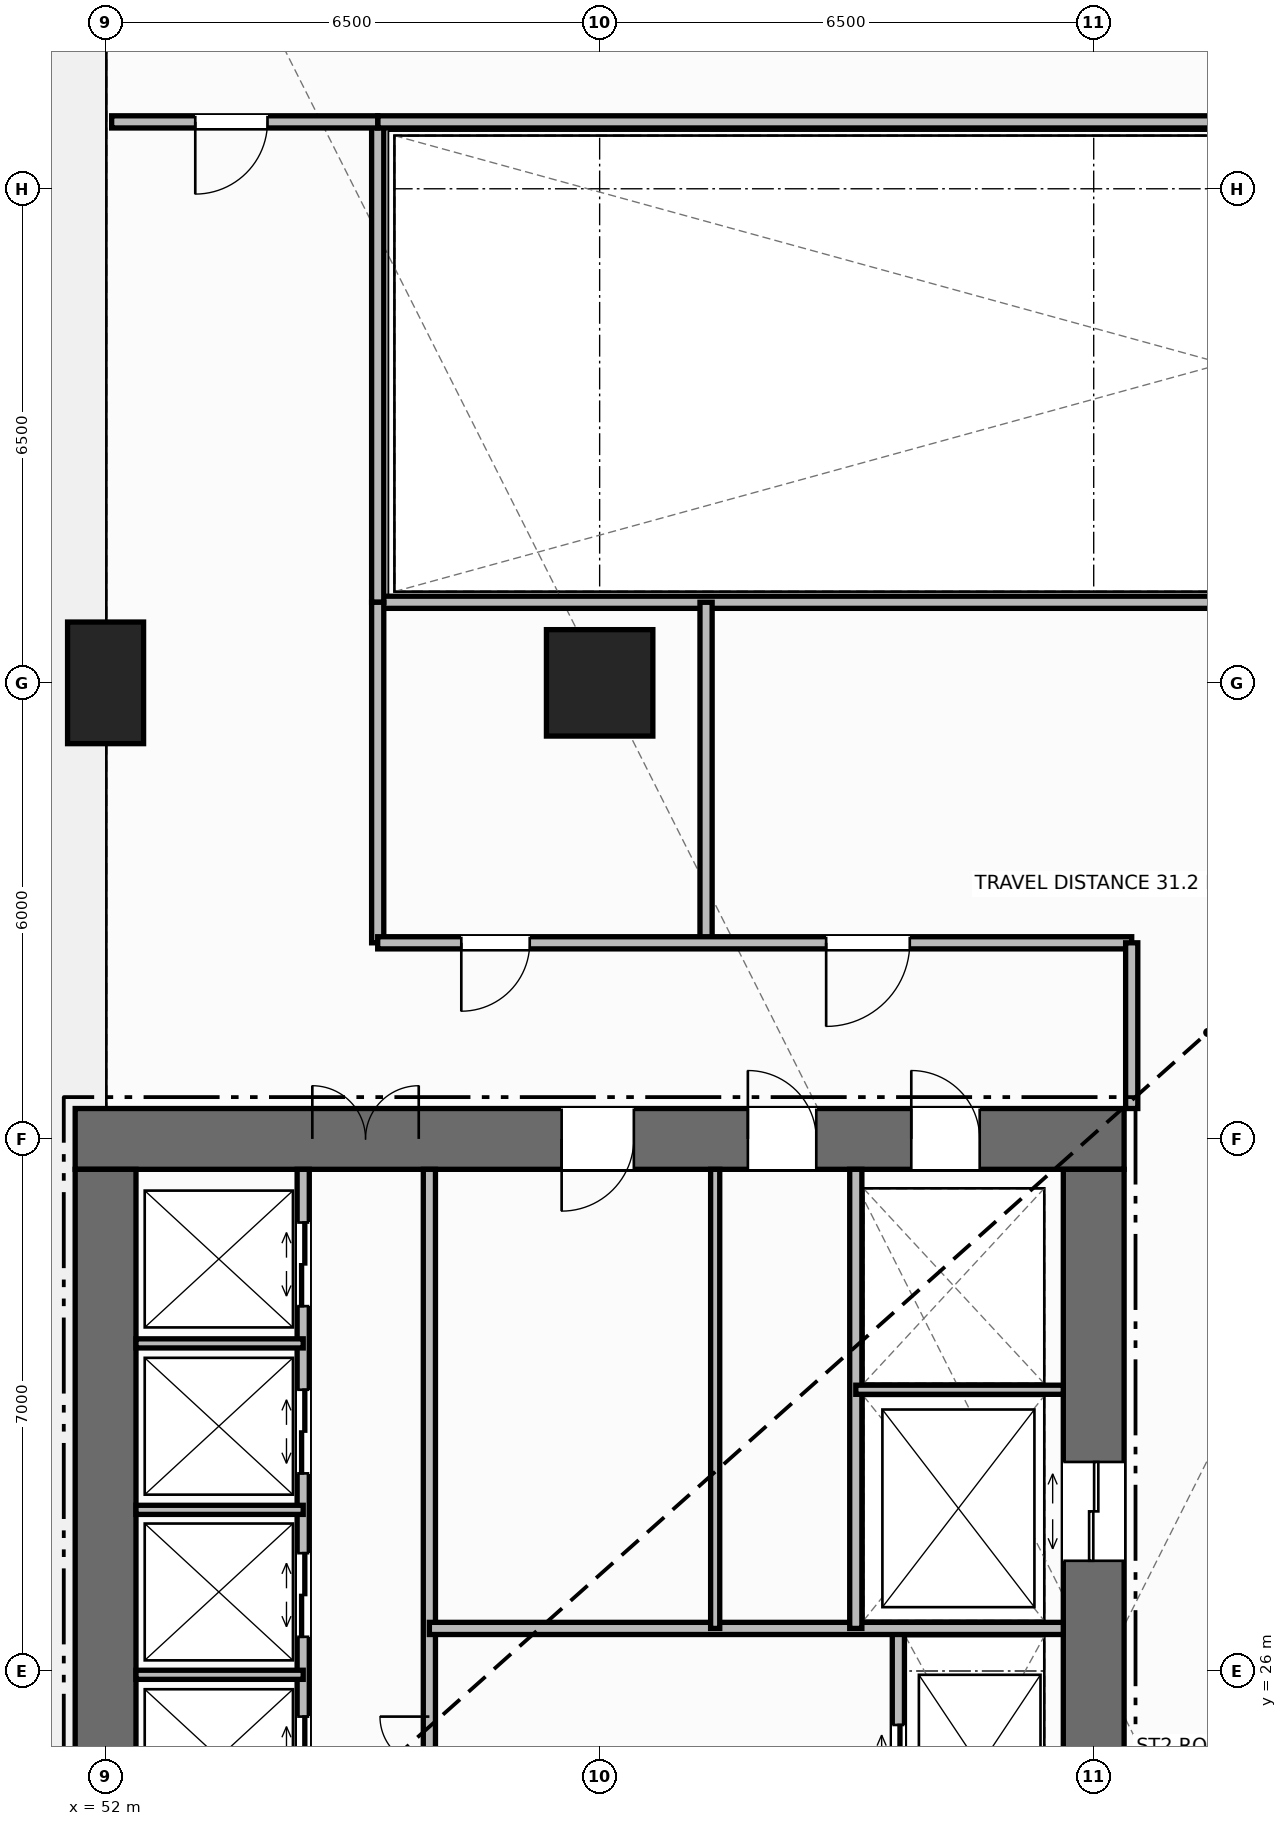
"""IFC4 building model, lengths in metres.
Left out: names, types, materials, properties, quantities, classifications, styles, units other than length and angle.
Written with IfcOpenShell. Run it as: python <this file> out.ifc"""

import sys

from ifc_helpers import new_model, si_unit, direction, frame, frame_2d, origin, origin_2d, place, context, subcontext, project, spatial, rectangle, extrude, element, fill, save


model = new_model("IFC4")
c1 = context("Model", 3, precision=1e-05, world=origin(), true_north=direction((0.0, 1.0)))
c2 = subcontext(c1, "Body", "Model", "MODEL_VIEW")
j1 = project(units=[si_unit("LENGTHUNIT", "METRE"), si_unit("PLANEANGLEUNIT", "RADIAN")], contexts=[c1])
p1 = place(None, origin())
s1 = spatial("IfcSite", under=j1, at=p1, CompositionType="ELEMENT")
p2 = place(p1, origin())
s2 = spatial("IfcBuilding", under=s1, at=p2, CompositionType="ELEMENT")
p3 = place(p2, origin())
s3 = spatial("IfcBuildingStorey", under=s2, at=p3, CompositionType="ELEMENT", Elevation=0.0)
p4 = place(p3, frame((51.6, 33.0, 0.0), z_axis=(0.0, 0.0, 1.0), x_axis=(1.0, 0.0, 0.0)))
e1 = element("IfcWall", 1, at=p4, inside=s3, PredefinedType="SHEAR", context=c2, shape_type="SweptSolid", body=[
    extrude(rectangle(XDim=13.8, YDim=0.8, at=frame_2d((6.9, 0.0))), origin(), (0.0, 0.0, 1.0), 6.0),
])
p5 = place(p4, frame((3.12, 0.0, 0.0)))
e2 = element("IfcOpeningElement", 2, at=p5, cuts=e1, PredefinedType="OPENING", context=c2, shape_type="SweptSolid", body=[
    extrude(rectangle(XDim=1.4, YDim=2.2, at=frame_2d((0.7, 1.1))), frame((0.0, 0.41, 0.0), z_axis=(0.0, -1.0, 0.0), x_axis=(1.0, 0.0, 0.0)), (0.0, 0.0, 1.0), 0.82),
])
p6 = place(p4, frame((11.0, 0.0, 0.0)))
e3 = element("IfcOpeningElement", 3, at=p6, cuts=e1, PredefinedType="OPENING", context=c2, shape_type="SweptSolid", body=[
    extrude(rectangle(XDim=0.9, YDim=2.15, at=frame_2d((0.45, 1.075))), frame((0.0, 0.41, 0.0), z_axis=(0.0, -1.0, 0.0), x_axis=(1.0, 0.0, 0.0)), (0.0, 0.0, 1.0), 0.82),
])
p7 = place(p4, frame((6.4, 0.0, 0.0)))
e4 = element("IfcOpeningElement", 4, at=p7, cuts=e1, PredefinedType="OPENING", context=c2, shape_type="SweptSolid", body=[
    extrude(rectangle(XDim=0.95, YDim=2.15, at=frame_2d((0.475, 1.075))), frame((0.0, 0.41, 0.0), z_axis=(0.0, -1.0, 0.0), x_axis=(1.0, 0.0, 0.0)), (0.0, 0.0, 1.0), 0.82),
])
p8 = place(p4, frame((8.85, 0.0, 0.0)))
e5 = element("IfcOpeningElement", 5, at=p8, cuts=e1, PredefinedType="OPENING", context=c2, shape_type="SweptSolid", body=[
    extrude(rectangle(XDim=0.9, YDim=2.15, at=frame_2d((0.45, 1.075))), frame((0.0, 0.41, 0.0), z_axis=(0.0, -1.0, 0.0), x_axis=(1.0, 0.0, 0.0)), (0.0, 0.0, 1.0), 0.82),
])
p9 = place(p3, frame((52.0, 19.4, 0.0), z_axis=(0.0, 0.0, 1.0), x_axis=(0.0, 1.0, 0.0)))
e6 = element("IfcWall", 6, at=p9, inside=s3, PredefinedType="SHEAR", context=c2, shape_type="SweptSolid", body=[
    extrude(rectangle(XDim=13.2, YDim=0.8, at=frame_2d((6.6, 0.0))), origin(), (0.0, 0.0, 1.0), 6.0),
])
p10 = place(p3, frame((65.0, 19.4, 0.0), z_axis=(0.0, 0.0, 1.0), x_axis=(0.0, 1.0, 0.0)))
e7 = element("IfcWall", 7, at=p10, inside=s3, PredefinedType="SHEAR", context=c2, shape_type="SweptSolid", body=[
    extrude(rectangle(XDim=13.2, YDim=0.8, at=frame_2d((6.6, 0.0))), origin(), (0.0, 0.0, 1.0), 6.0),
])
p11 = place(p10, frame((8.05, 0.0, 0.0)))
e8 = element("IfcOpeningElement", 8, at=p11, cuts=e7, PredefinedType="OPENING", context=c2, shape_type="SweptSolid", body=[
    extrude(rectangle(XDim=1.3, YDim=2.2, at=frame_2d((0.65, 1.1))), frame((0.0, 0.41, 0.0), z_axis=(0.0, -1.0, 0.0), x_axis=(1.0, 0.0, 0.0)), (0.0, 0.0, 1.0), 0.82),
])
p12 = place(p3, frame((58.5, 39.0, 0.0), z_axis=(0.0, 0.0, 1.0), x_axis=(1.0, 0.0, 0.0)))
e9 = element("IfcColumn", 9, at=p12, inside=s3, PredefinedType="COLUMN", context=c2, shape_type="SweptSolid", body=[
    extrude(rectangle(XDim=1.4, YDim=1.4, at=origin_2d()), origin(), (0.0, 0.0, 1.0), 6.0),
])
p13 = place(p3, frame((52.0, 39.0, 0.0), z_axis=(0.0, 0.0, 1.0), x_axis=(1.0, 0.0, 0.0)))
e10 = element("IfcColumn", 10, at=p13, inside=s3, PredefinedType="PILASTER", context=c2, shape_type="SweptSolid", body=[
    extrude(rectangle(XDim=1.0, YDim=1.6, at=origin_2d()), origin(), (0.0, 0.0, 1.0), 6.0),
])
p14 = place(p3, frame((54.6, 19.4, 0.0), z_axis=(0.0, 0.0, 1.0), x_axis=(0.0, 1.0, 0.0)))
e11 = element("IfcWall", 11, at=p14, inside=s3, PredefinedType="STANDARD", context=c2, shape_type="SweptSolid", body=[
    extrude(rectangle(XDim=13.2, YDim=0.16, at=frame_2d((6.6, 0.0))), origin(), (0.0, 0.0, 1.0), 5.72),
])
p15 = place(p14, frame((0.55, 0.0, 0.0)))
e12 = element("IfcOpeningElement", 12, at=p15, cuts=e11, PredefinedType="OPENING", context=c2, shape_type="SweptSolid", body=[
    extrude(rectangle(XDim=1.1, YDim=2.2, at=frame_2d((0.55, 1.1))), frame((0.0, 0.09, 0.0), z_axis=(0.0, -1.0, 0.0), x_axis=(1.0, 0.0, 0.0)), (0.0, 0.0, 1.0), 0.18),
])
p16 = place(p14, frame((2.7, 0.0, 0.0)))
e13 = element("IfcOpeningElement", 13, at=p16, cuts=e11, PredefinedType="OPENING", context=c2, shape_type="SweptSolid", body=[
    extrude(rectangle(XDim=1.1, YDim=2.2, at=frame_2d((0.55, 1.1))), frame((0.0, 0.09, 0.0), z_axis=(0.0, -1.0, 0.0), x_axis=(1.0, 0.0, 0.0)), (0.0, 0.0, 1.0), 0.18),
])
p17 = place(p14, frame((4.9, 0.0, 0.0)))
e14 = element("IfcOpeningElement", 14, at=p17, cuts=e11, PredefinedType="OPENING", context=c2, shape_type="SweptSolid", body=[
    extrude(rectangle(XDim=1.1, YDim=2.2, at=frame_2d((0.55, 1.1))), frame((0.0, 0.09, 0.0), z_axis=(0.0, -1.0, 0.0), x_axis=(1.0, 0.0, 0.0)), (0.0, 0.0, 1.0), 0.18),
])
p18 = place(p14, frame((7.05, 0.0, 0.0)))
e15 = element("IfcOpeningElement", 15, at=p18, cuts=e11, PredefinedType="OPENING", context=c2, shape_type="SweptSolid", body=[
    extrude(rectangle(XDim=1.1, YDim=2.2, at=frame_2d((0.55, 1.1))), frame((0.0, 0.09, 0.0), z_axis=(0.0, -1.0, 0.0), x_axis=(1.0, 0.0, 0.0)), (0.0, 0.0, 1.0), 0.18),
])
p19 = place(p14, frame((9.2, 0.0, 0.0)))
e16 = element("IfcOpeningElement", 16, at=p19, cuts=e11, PredefinedType="OPENING", context=c2, shape_type="SweptSolid", body=[
    extrude(rectangle(XDim=1.1, YDim=2.2, at=frame_2d((0.55, 1.1))), frame((0.0, 0.09, 0.0), z_axis=(0.0, -1.0, 0.0), x_axis=(1.0, 0.0, 0.0)), (0.0, 0.0, 1.0), 0.18),
])
p20 = place(p14, frame((11.4, 0.0, 0.0)))
e17 = element("IfcOpeningElement", 17, at=p20, cuts=e11, PredefinedType="OPENING", context=c2, shape_type="SweptSolid", body=[
    extrude(rectangle(XDim=1.1, YDim=2.2, at=frame_2d((0.55, 1.1))), frame((0.0, 0.09, 0.0), z_axis=(0.0, -1.0, 0.0), x_axis=(1.0, 0.0, 0.0)), (0.0, 0.0, 1.0), 0.18),
])
p21 = place(p3, frame((56.26, 23.09, 0.0), z_axis=(0.0, 0.0, 1.0), x_axis=(0.0, 1.0, 0.0)))
e18 = element("IfcWall", 18, at=p21, inside=s3, PredefinedType="STANDARD", context=c2, shape_type="SweptSolid", body=[
    extrude(rectangle(XDim=9.51, YDim=0.16, at=frame_2d((4.755, 0.0))), origin(), (0.0, 0.0, 1.0), 5.72),
])
p22 = place(p21, frame((1.01, 0.0, 0.0)))
e19 = element("IfcOpeningElement", 19, at=p22, cuts=e18, PredefinedType="OPENING", context=c2, shape_type="SweptSolid", body=[
    extrude(rectangle(XDim=1.3, YDim=2.2, at=frame_2d((0.65, 1.1))), frame((0.0, 0.09, 0.0), z_axis=(0.0, -1.0, 0.0), x_axis=(1.0, 0.0, 0.0)), (0.0, 0.0, 1.0), 0.18),
])
for number, where, z_axis, x_axis in (
    (20, (52.4, 25.95, 0.0), (0.0, 0.0, 1.0), (1.0, 0.0, 0.0)),
    (21, (52.4, 28.12, 0.0), (0.0, 0.0, 1.0), (1.0, 0.0, 0.0)),
    (22, (52.4, 30.31, 0.0), (0.0, 0.0, 1.0), (1.0, 0.0, 0.0)),
):
    element("IfcWall", number, at=place(p3, frame(where, z_axis=z_axis, x_axis=x_axis)), inside=s3, PredefinedType="PARTITIONING", context=c2, shape_type="SweptSolid", body=[
        extrude(rectangle(XDim=2.2, YDim=0.12, at=frame_2d((1.1, 0.0))), origin(), (0.0, 0.0, 1.0), 5.72),
    ])
p23 = place(p3, frame((62.43, 23.09, 0.0), z_axis=(0.0, 0.0, 1.0), x_axis=(0.0, 1.0, 0.0)))
e23 = element("IfcWall", 23, at=p23, inside=s3, PredefinedType="STANDARD", context=c2, shape_type="SweptSolid", body=[
    extrude(rectangle(XDim=3.47, YDim=0.16, at=frame_2d((1.735, 0.0))), origin(), (0.0, 0.0, 1.0), 5.72),
])
p24 = place(p23, frame((1.1, 0.0, 0.0)))
e24 = element("IfcOpeningElement", 24, at=p24, cuts=e23, PredefinedType="OPENING", context=c2, shape_type="SweptSolid", body=[
    extrude(rectangle(XDim=1.1, YDim=2.2, at=frame_2d((0.55, 1.1))), frame((0.0, 0.09, 0.0), z_axis=(0.0, -1.0, 0.0), x_axis=(1.0, 0.0, 0.0)), (0.0, 0.0, 1.0), 0.18),
])
p25 = place(p3, frame((56.26, 26.56, 0.0), z_axis=(0.0, 0.0, 1.0), x_axis=(1.0, 0.0, 0.0)))
e25 = element("IfcWall", 25, at=p25, inside=s3, PredefinedType="STANDARD", context=c2, shape_type="SweptSolid", body=[
    extrude(rectangle(XDim=8.34, YDim=0.16, at=frame_2d((4.17, 0.0))), origin(), (0.0, 0.0, 1.0), 5.72),
])
p26 = place(p3, frame((61.87, 26.56, 0.0), z_axis=(0.0, 0.0, 1.0), x_axis=(0.0, 1.0, 0.0)))
e26 = element("IfcWall", 26, at=p26, inside=s3, PredefinedType="STANDARD", context=c2, shape_type="SweptSolid", body=[
    extrude(rectangle(XDim=6.04, YDim=0.16, at=frame_2d((3.02, 0.0))), origin(), (0.0, 0.0, 1.0), 5.72),
])
p27 = place(p3, frame((61.87, 29.7, 0.0), z_axis=(0.0, 0.0, 1.0), x_axis=(1.0, 0.0, 0.0)))
e27 = element("IfcWall", 27, at=p27, inside=s3, PredefinedType="PARTITIONING", context=c2, shape_type="SweptSolid", body=[
    extrude(rectangle(XDim=2.73, YDim=0.12, at=frame_2d((1.365, 0.0))), origin(), (0.0, 0.0, 1.0), 5.72),
])
p28 = place(p3, frame((60.02, 26.56, 0.0), z_axis=(0.0, 0.0, 1.0), x_axis=(0.0, 1.0, 0.0)))
e28 = element("IfcWall", 28, at=p28, inside=s3, PredefinedType="PARTITIONING", context=c2, shape_type="SweptSolid", body=[
    extrude(rectangle(XDim=6.04, YDim=0.12, at=frame_2d((3.02, 0.0))), origin(), (0.0, 0.0, 1.0), 5.72),
])
p29 = place(p3, frame((55.58, 40.06, 0.0), z_axis=(0.0, 0.0, 1.0), x_axis=(1.0, 0.0, 0.0)))
e29 = element("IfcWall", 29, at=p29, inside=s3, PredefinedType="STANDARD", context=c2, shape_type="SweptSolid", body=[
    extrude(rectangle(XDim=22.47, YDim=0.16, at=frame_2d((11.235, 0.0))), origin(), (0.0, 0.0, 1.0), 5.72),
])
p30 = place(p3, frame((55.58, 40.06, 0.0), z_axis=(0.0, 0.0, 1.0), x_axis=(0.0, 1.0, 0.0)))
e30 = element("IfcWall", 30, at=p30, inside=s3, PredefinedType="STANDARD", context=c2, shape_type="SweptSolid", body=[
    extrude(rectangle(XDim=6.32, YDim=0.16, at=frame_2d((3.16, 0.0))), origin(), (0.0, 0.0, 1.0), 5.72),
])
p31 = place(p3, frame((55.58, 46.38, 0.0), z_axis=(0.0, 0.0, 1.0), x_axis=(1.0, 0.0, 0.0)))
e31 = element("IfcWall", 31, at=p31, inside=s3, PredefinedType="STANDARD", context=c2, shape_type="SweptSolid", body=[
    extrude(rectangle(XDim=22.47, YDim=0.16, at=frame_2d((11.235, 0.0))), origin(), (0.0, 0.0, 1.0), 5.72),
])
for number, where, z_axis, x_axis in (
    (32, (55.58, 35.58, 0.0), (0.0, 0.0, 1.0), (0.0, 1.0, 0.0)),
    (33, (59.9, 35.58, 0.0), (0.0, 0.0, 1.0), (0.0, 1.0, 0.0)),
):
    element("IfcWall", number, at=place(p3, frame(where, z_axis=z_axis, x_axis=x_axis)), inside=s3, PredefinedType="STANDARD", context=c2, shape_type="SweptSolid", body=[
        extrude(rectangle(XDim=4.48, YDim=0.16, at=frame_2d((2.24, 0.0))), origin(), (0.0, 0.0, 1.0), 5.72),
    ])
p32 = place(p3, frame((55.58, 35.58, 0.0), z_axis=(0.0, 0.0, 1.0), x_axis=(1.0, 0.0, 0.0)))
e34 = element("IfcWall", 34, at=p32, inside=s3, PredefinedType="STANDARD", context=c2, shape_type="SweptSolid", body=[
    extrude(rectangle(XDim=9.92, YDim=0.16, at=frame_2d((4.96, 0.0))), origin(), (0.0, 0.0, 1.0), 5.72),
])
p33 = place(p32, frame((1.1, 0.0, 0.0)))
e35 = element("IfcOpeningElement", 35, at=p33, cuts=e34, PredefinedType="OPENING", context=c2, shape_type="SweptSolid", body=[
    extrude(rectangle(XDim=0.9, YDim=2.15, at=frame_2d((0.45, 1.075))), frame((0.0, 0.09, 0.0), z_axis=(0.0, -1.0, 0.0), x_axis=(1.0, 0.0, 0.0)), (0.0, 0.0, 1.0), 0.18),
])
p34 = place(p32, frame((5.9, 0.0, 0.0)))
e36 = element("IfcOpeningElement", 36, at=p34, cuts=e34, PredefinedType="OPENING", context=c2, shape_type="SweptSolid", body=[
    extrude(rectangle(XDim=1.1, YDim=2.15, at=frame_2d((0.55, 1.075))), frame((0.0, 0.09, 0.0), z_axis=(0.0, -1.0, 0.0), x_axis=(1.0, 0.0, 0.0)), (0.0, 0.0, 1.0), 0.18),
])
p35 = place(p3, frame((65.5, 33.4, 0.0), z_axis=(0.0, 0.0, 1.0), x_axis=(0.0, 1.0, 0.0)))
e37 = element("IfcWall", 37, at=p35, inside=s3, PredefinedType="STANDARD", context=c2, shape_type="SweptSolid", body=[
    extrude(rectangle(XDim=2.18, YDim=0.16, at=frame_2d((1.09, 0.0))), origin(), (0.0, 0.0, 1.0), 5.72),
])
p36 = place(p3, frame((52.08, 46.38, 0.0), z_axis=(0.0, 0.0, 1.0), x_axis=(1.0, 0.0, 0.0)))
e38 = element("IfcWall", 38, at=p36, inside=s3, PredefinedType="STANDARD", context=c2, shape_type="SweptSolid", body=[
    extrude(rectangle(XDim=3.5, YDim=0.16, at=frame_2d((1.75, 0.0))), origin(), (0.0, 0.0, 1.0), 5.72),
])
p37 = place(p36, frame((1.1, 0.0, 0.0)))
e39 = element("IfcOpeningElement", 39, at=p37, cuts=e38, PredefinedType="OPENING", context=c2, shape_type="SweptSolid", body=[
    extrude(rectangle(XDim=0.95, YDim=2.15, at=frame_2d((0.475, 1.075))), frame((0.0, 0.09, 0.0), z_axis=(0.0, -1.0, 0.0), x_axis=(1.0, 0.0, 0.0)), (0.0, 0.0, 1.0), 0.18),
])
p38 = place(p5, origin())
e40 = element("IfcDoor", 40, at=p38, inside=s3, OperationType="DOUBLE_DOOR_SINGLE_SWING", PredefinedType="DOOR", context=c2, shape_type="SweptSolid", body=[
    extrude(rectangle(XDim=1.4, YDim=2.2, at=frame_2d((0.7, 1.1))), frame((0.0, -0.075, 0.0), z_axis=(0.0, -1.0, 0.0), x_axis=(1.0, 0.0, 0.0)), (0.0, 0.0, 1.0), 0.05),
])
fill(e2, e40)
p39 = place(p17, origin())
e41 = element("IfcDoor", 41, at=p39, inside=s3, OperationType="DOUBLE_DOOR_SLIDING", PredefinedType="DOOR", context=c2, shape_type="SweptSolid", body=[
    extrude(rectangle(XDim=1.1, YDim=2.2, at=frame_2d((0.55, 1.1))), frame((0.0, 0.025, 0.0), z_axis=(0.0, -1.0, 0.0), x_axis=(1.0, 0.0, 0.0)), (0.0, 0.0, 1.0), 0.05),
])
fill(e14, e41)
p40 = place(p18, origin())
e42 = element("IfcDoor", 42, at=p40, inside=s3, OperationType="DOUBLE_DOOR_SLIDING", PredefinedType="DOOR", context=c2, shape_type="SweptSolid", body=[
    extrude(rectangle(XDim=1.1, YDim=2.2, at=frame_2d((0.55, 1.1))), frame((0.0, 0.025, 0.0), z_axis=(0.0, -1.0, 0.0), x_axis=(1.0, 0.0, 0.0)), (0.0, 0.0, 1.0), 0.05),
])
fill(e15, e42)
p41 = place(p19, origin())
e43 = element("IfcDoor", 43, at=p41, inside=s3, OperationType="DOUBLE_DOOR_SLIDING", PredefinedType="DOOR", context=c2, shape_type="SweptSolid", body=[
    extrude(rectangle(XDim=1.1, YDim=2.2, at=frame_2d((0.55, 1.1))), frame((0.0, 0.025, 0.0), z_axis=(0.0, -1.0, 0.0), x_axis=(1.0, 0.0, 0.0)), (0.0, 0.0, 1.0), 0.05),
])
fill(e16, e43)
p42 = place(p20, origin())
e44 = element("IfcDoor", 44, at=p42, inside=s3, OperationType="DOUBLE_DOOR_SLIDING", PredefinedType="DOOR", context=c2, shape_type="SweptSolid", body=[
    extrude(rectangle(XDim=1.1, YDim=2.2, at=frame_2d((0.55, 1.1))), frame((0.0, 0.025, 0.0), z_axis=(0.0, -1.0, 0.0), x_axis=(1.0, 0.0, 0.0)), (0.0, 0.0, 1.0), 0.05),
])
fill(e17, e44)
p43 = place(p24, origin())
e45 = element("IfcDoor", 45, at=p43, inside=s3, OperationType="DOUBLE_DOOR_SLIDING", PredefinedType="DOOR", context=c2, shape_type="SweptSolid", body=[
    extrude(rectangle(XDim=1.1, YDim=2.2, at=frame_2d((0.55, 1.1))), frame((0.0, 0.025, 0.0), z_axis=(0.0, -1.0, 0.0), x_axis=(1.0, 0.0, 0.0)), (0.0, 0.0, 1.0), 0.05),
])
fill(e24, e45)
p44 = place(p22, origin())
e46 = element("IfcDoor", 46, at=p44, inside=s3, OperationType="DOUBLE_DOOR_SINGLE_SWING", PredefinedType="DOOR", context=c2, shape_type="SweptSolid", body=[
    extrude(rectangle(XDim=1.3, YDim=2.2, at=frame_2d((0.65, 1.1))), frame((0.0, 0.025, 0.0), z_axis=(0.0, -1.0, 0.0), x_axis=(1.0, 0.0, 0.0)), (0.0, 0.0, 1.0), 0.05),
])
fill(e19, e46)
p45 = place(p11, origin())
e47 = element("IfcDoor", 47, at=p45, inside=s3, OperationType="DOUBLE_DOOR_SLIDING", PredefinedType="DOOR", context=c2, shape_type="SweptSolid", body=[
    extrude(rectangle(XDim=1.3, YDim=2.2, at=frame_2d((0.65, 1.1))), frame((0.0, 0.025, 0.0), z_axis=(0.0, -1.0, 0.0), x_axis=(1.0, 0.0, 0.0)), (0.0, 0.0, 1.0), 0.05),
])
fill(e8, e47)
p46 = place(p6, origin())
e48 = element("IfcDoor", 48, at=p46, inside=s3, OperationType="SINGLE_SWING_LEFT", PredefinedType="DOOR", context=c2, shape_type="SweptSolid", body=[
    extrude(rectangle(XDim=0.9, YDim=2.15, at=frame_2d((0.45, 1.075))), frame((0.0, -0.075, 0.0), z_axis=(0.0, -1.0, 0.0), x_axis=(1.0, 0.0, 0.0)), (0.0, 0.0, 1.0), 0.05),
])
fill(e3, e48)
p47 = place(p7, origin())
e49 = element("IfcDoor", 49, at=p47, inside=s3, OperationType="SINGLE_SWING_RIGHT", PredefinedType="DOOR", context=c2, shape_type="SweptSolid", body=[
    extrude(rectangle(XDim=0.95, YDim=2.15, at=frame_2d((0.475, 1.075))), frame((0.0, -0.075, 0.0), z_axis=(0.0, -1.0, 0.0), x_axis=(1.0, 0.0, 0.0)), (0.0, 0.0, 1.0), 0.05),
])
fill(e4, e49)
p48 = place(p8, origin())
e50 = element("IfcDoor", 50, at=p48, inside=s3, OperationType="SINGLE_SWING_LEFT", PredefinedType="DOOR", context=c2, shape_type="SweptSolid", body=[
    extrude(rectangle(XDim=0.9, YDim=2.15, at=frame_2d((0.45, 1.075))), frame((0.0, -0.075, 0.0), z_axis=(0.0, -1.0, 0.0), x_axis=(1.0, 0.0, 0.0)), (0.0, 0.0, 1.0), 0.05),
])
fill(e5, e50)
p49 = place(p33, origin())
e51 = element("IfcDoor", 51, at=p49, inside=s3, OperationType="SINGLE_SWING_RIGHT", PredefinedType="DOOR", context=c2, shape_type="SweptSolid", body=[
    extrude(rectangle(XDim=0.9, YDim=2.15, at=frame_2d((0.45, 1.075))), frame((0.0, 0.025, 0.0), z_axis=(0.0, -1.0, 0.0), x_axis=(1.0, 0.0, 0.0)), (0.0, 0.0, 1.0), 0.05),
])
fill(e35, e51)
p50 = place(p34, origin())
e52 = element("IfcDoor", 52, at=p50, inside=s3, OperationType="SINGLE_SWING_RIGHT", PredefinedType="DOOR", context=c2, shape_type="SweptSolid", body=[
    extrude(rectangle(XDim=1.1, YDim=2.15, at=frame_2d((0.55, 1.075))), frame((0.0, 0.025, 0.0), z_axis=(0.0, -1.0, 0.0), x_axis=(1.0, 0.0, 0.0)), (0.0, 0.0, 1.0), 0.05),
])
fill(e36, e52)
p51 = place(p37, origin())
e53 = element("IfcDoor", 53, at=p51, inside=s3, OperationType="SINGLE_SWING_RIGHT", PredefinedType="DOOR", context=c2, shape_type="SweptSolid", body=[
    extrude(rectangle(XDim=0.95, YDim=2.15, at=frame_2d((0.475, 1.075))), frame((0.0, 0.025, 0.0), z_axis=(0.0, -1.0, 0.0), x_axis=(1.0, 0.0, 0.0)), (0.0, 0.0, 1.0), 0.05),
])
fill(e39, e53)
save(model, sys.argv[1])
